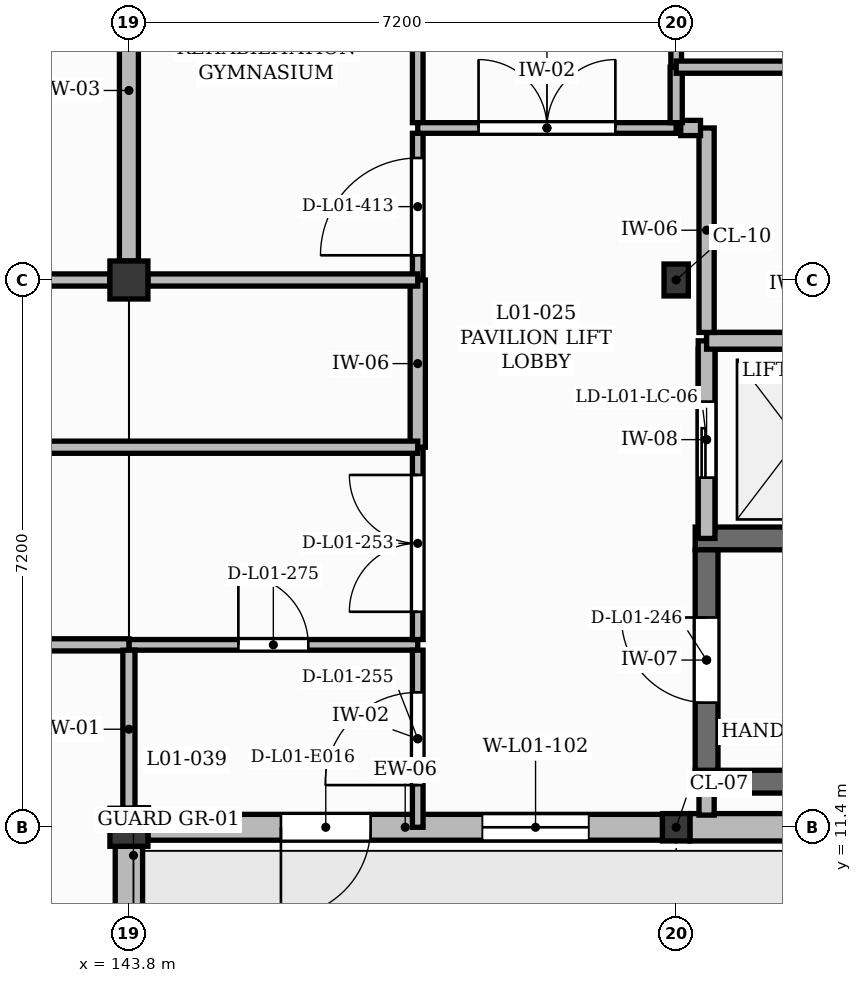
"""IFC4 building model, lengths in metres.
Left out: names, types, materials, properties, quantities, classifications, styles, units other than length and angle.
Written with IfcOpenShell. Run it as: python <this file> out.ifc"""

import sys

from ifc_helpers import new_model, si_unit, direction, frame, frame_2d, origin, origin_2d, place, context, subcontext, project, spatial, rectangle, extrude, element, fill, save


model = new_model("IFC4")
c1 = context("Model", 3, precision=1e-05, world=origin(), true_north=direction((0.0, 1.0)))
c2 = subcontext(c1, "Body", "Model", "MODEL_VIEW")
j1 = project(units=[si_unit("LENGTHUNIT", "METRE"), si_unit("PLANEANGLEUNIT", "RADIAN")], contexts=[c1])
p1 = place(None, origin())
s1 = spatial("IfcSite", under=j1, at=p1, CompositionType="ELEMENT")
p2 = place(p1, origin())
s2 = spatial("IfcBuilding", under=s1, at=p2, CompositionType="ELEMENT")
p3 = place(p2, frame((0.0, 0.0, 4.5)))
s3 = spatial("IfcBuildingStorey", under=s2, at=p3, CompositionType="ELEMENT", Elevation=4.5)
for number, where, z_axis, x_axis in (
    (1, (143.8, 11.4, 0.0), (0.0, 0.0, 1.0), (1.0, 0.0, 0.0)),
    (2, (143.8, 18.6, 0.0), (0.0, 0.0, 1.0), (1.0, 0.0, 0.0)),
):
    element("IfcColumn", number, at=place(p3, frame(where, z_axis=z_axis, x_axis=x_axis)), inside=s3, PredefinedType="COLUMN", context=c2, shape_type="SweptSolid", body=[
        extrude(rectangle(XDim=0.5, YDim=0.5, at=origin_2d()), origin(), (0.0, 0.0, 1.0), 4.22),
    ])
p4 = place(p3, frame((151.0, 11.4, 0.0), z_axis=(0.0, 0.0, 1.0), x_axis=(1.0, 0.0, 0.0)))
e3 = element("IfcColumn", 3, at=p4, inside=s3, PredefinedType="COLUMN", context=c2, shape_type="SweptSolid", body=[
    extrude(rectangle(XDim=0.36, YDim=0.36, at=origin_2d()), origin(), (0.0, 0.0, 1.0), 4.26),
])
p5 = place(p3, frame((151.0, 18.6, 0.0), z_axis=(0.0, 0.0, 1.0), x_axis=(1.0, 0.0, 0.0)))
e4 = element("IfcColumn", 4, at=p5, inside=s3, PredefinedType="COLUMN", context=c2, shape_type="SweptSolid", body=[
    extrude(rectangle(XDim=0.32, YDim=0.42, at=origin_2d()), origin(), (0.0, 0.0, 1.0), 4.26),
])
p6 = place(p3, frame((143.8, 4.45, 0.0), z_axis=(0.0, 0.0, 1.0), x_axis=(0.0, 1.0, 0.0)))
e5 = element("IfcWall", 5, at=p6, inside=s3, PredefinedType="SOLIDWALL", context=c2, shape_type="SweptSolid", body=[
    extrude(rectangle(XDim=6.7, YDim=0.36, at=frame_2d((3.35, 0.0))), origin(), (0.0, 0.0, 1.0), 3.52),
])
p7 = place(p6, frame((0.665, 0.0, 1.05)))
e6 = element("IfcOpeningElement", 6, at=p7, cuts=e5, PredefinedType="OPENING", context=c2, shape_type="SweptSolid", body=[
    extrude(rectangle(XDim=1.54, YDim=1.65, at=frame_2d((0.77, 0.825))), frame((0.0, 0.19, 0.0), z_axis=(0.0, -1.0, 0.0), x_axis=(1.0, 0.0, 0.0)), (0.0, 0.0, 1.0), 0.38),
])
p8 = place(p6, frame((3.475, 0.0, 1.5)))
e7 = element("IfcOpeningElement", 7, at=p8, cuts=e5, PredefinedType="OPENING", context=c2, shape_type="SweptSolid", body=[
    extrude(rectangle(XDim=1.15, YDim=1.25, at=frame_2d((0.575, 0.625))), frame((0.0, 0.19, 0.0), z_axis=(0.0, -1.0, 0.0), x_axis=(1.0, 0.0, 0.0)), (0.0, 0.0, 1.0), 0.38),
])
p9 = place(p3, frame((144.05, 11.4, 0.0), z_axis=(0.0, 0.0, 1.0), x_axis=(1.0, 0.0, 0.0)))
e8 = element("IfcWall", 8, at=p9, inside=s3, PredefinedType="SOLIDWALL", context=c2, shape_type="SweptSolid", body=[
    extrude(rectangle(XDim=6.77, YDim=0.34, at=frame_2d((3.385, 0.0))), origin(), (0.0, 0.0, 1.0), 3.76),
])
p10 = place(p9, frame((1.75, 0.0, 0.0)))
e9 = element("IfcOpeningElement", 9, at=p10, cuts=e8, PredefinedType="OPENING", context=c2, shape_type="SweptSolid", body=[
    extrude(rectangle(XDim=1.18, YDim=2.2, at=frame_2d((0.59, 1.1))), frame((0.0, 0.18, 0.0), z_axis=(0.0, -1.0, 0.0), x_axis=(1.0, 0.0, 0.0)), (0.0, 0.0, 1.0), 0.36),
])
p11 = place(p9, frame((4.4, 0.0, 1.05)))
e10 = element("IfcOpeningElement", 10, at=p11, cuts=e8, PredefinedType="OPENING", context=c2, shape_type="SweptSolid", body=[
    extrude(rectangle(XDim=1.4, YDim=1.65, at=frame_2d((0.7, 0.825))), frame((0.0, 0.18, 0.0), z_axis=(0.0, -1.0, 0.0), x_axis=(1.0, 0.0, 0.0)), (0.0, 0.0, 1.0), 0.36),
])
p12 = place(p3, frame((151.18, 11.4, 0.0), z_axis=(0.0, 0.0, 1.0), x_axis=(1.0, 0.0, 0.0)))
e11 = element("IfcWall", 11, at=p12, inside=s3, PredefinedType="SOLIDWALL", context=c2, shape_type="SweptSolid", body=[
    extrude(rectangle(XDim=6.86, YDim=0.36, at=frame_2d((3.43, 0.0))), origin(), (0.0, 0.0, 1.0), 3.8),
])
for number, where, z_axis, x_axis in (
    (12, (151.25, 12.0, 0.0), (0.0, 0.0, 1.0), (1.0, 0.0, 0.0)),
    (13, (151.25, 15.2, 0.0), (0.0, 0.0, 1.0), (1.0, 0.0, 0.0)),
):
    element("IfcWall", number, at=place(p3, frame(where, z_axis=z_axis, x_axis=x_axis)), inside=s3, PredefinedType="SHEAR", context=c2, shape_type="SweptSolid", body=[
        extrude(rectangle(XDim=6.7, YDim=0.3, at=frame_2d((3.35, 0.0))), origin(), (0.0, 0.0, 1.0), 4.25),
    ])
p13 = place(p3, frame((151.4, 12.15, 0.0), z_axis=(0.0, 0.0, 1.0), x_axis=(0.0, 1.0, 0.0)))
e14 = element("IfcWall", 14, at=p13, inside=s3, PredefinedType="SHEAR", context=c2, shape_type="SweptSolid", body=[
    extrude(rectangle(XDim=2.9, YDim=0.3, at=frame_2d((1.45, 0.0))), origin(), (0.0, 0.0, 1.0), 4.25),
])
p14 = place(p13, frame((0.89, 0.0, 0.0)))
e15 = element("IfcOpeningElement", 15, at=p14, cuts=e14, PredefinedType="OPENING", context=c2, shape_type="SweptSolid", body=[
    extrude(rectangle(XDim=1.12, YDim=2.1, at=frame_2d((0.56, 1.05))), frame((0.0, 0.16, 0.0), z_axis=(0.0, -1.0, 0.0), x_axis=(1.0, 0.0, 0.0)), (0.0, 0.0, 1.0), 0.32),
])
p15 = place(p3, frame((151.4, 17.8, 0.0), z_axis=(0.0, 0.0, 1.0), x_axis=(1.0, 0.0, 0.0)))
e16 = element("IfcWall", 16, at=p15, inside=s3, PredefinedType="SOLIDWALL", context=c2, shape_type="SweptSolid", body=[
    extrude(rectangle(XDim=2.4, YDim=0.22, at=frame_2d((1.2, 0.0))), origin(), (0.0, 0.0, 1.0), 4.25),
])
p16 = place(p3, frame((151.4, 15.31, 0.0), z_axis=(0.0, 0.0, 1.0), x_axis=(0.0, 1.0, 0.0)))
e17 = element("IfcWall", 17, at=p16, inside=s3, PredefinedType="SOLIDWALL", context=c2, shape_type="SweptSolid", body=[
    extrude(rectangle(XDim=2.38, YDim=0.22, at=frame_2d((1.19, 0.0))), origin(), (0.0, 0.0, 1.0), 4.25),
])
p17 = place(p16, frame((0.69, 0.0, 0.0)))
e18 = element("IfcOpeningElement", 18, at=p17, cuts=e17, PredefinedType="OPENING", context=c2, shape_type="SweptSolid", body=[
    extrude(rectangle(XDim=1.0, YDim=2.15, at=frame_2d((0.5, 1.075))), frame((0.0, 0.12, 0.0), z_axis=(0.0, -1.0, 0.0), x_axis=(1.0, 0.0, 0.0)), (0.0, 0.0, 1.0), 0.24),
])
p18 = place(p3, frame((151.4, 15.2, -0.9), z_axis=(0.0, 0.0, 1.0), x_axis=(0.0, 1.0, 0.0)))
e19 = element("IfcWall", 19, at=p18, inside=s3, PredefinedType="SOLIDWALL", context=c2, shape_type="SweptSolid", body=[
    extrude(rectangle(XDim=2.6, YDim=0.22, at=frame_2d((1.3, 0.0))), origin(), (0.0, 0.0, 1.0), 0.9),
])
p19 = place(p3, frame((151.4, 17.8, -0.9), z_axis=(0.0, 0.0, 1.0), x_axis=(1.0, 0.0, 0.0)))
e20 = element("IfcWall", 20, at=p19, inside=s3, PredefinedType="SOLIDWALL", context=c2, shape_type="SweptSolid", body=[
    extrude(rectangle(XDim=2.4, YDim=0.22, at=frame_2d((1.2, 0.0))), origin(), (0.0, 0.0, 1.0), 0.9),
])
p20 = place(p3, frame((143.8, 13.8, 0.0), z_axis=(0.0, 0.0, 1.0), x_axis=(1.0, 0.0, 0.0)))
e21 = element("IfcWall", 21, at=p20, inside=s3, PredefinedType="PARTITIONING", context=c2, shape_type="SweptSolid", body=[
    extrude(rectangle(XDim=3.8, YDim=0.14, at=frame_2d((1.9, 0.0))), origin(), (0.0, 0.0, 1.0), 4.18),
])
p21 = place(p20, frame((1.44, 0.0, 0.0)))
e22 = element("IfcOpeningElement", 22, at=p21, cuts=e21, PredefinedType="OPENING", context=c2, shape_type="SweptSolid", body=[
    extrude(rectangle(XDim=0.92, YDim=2.1, at=frame_2d((0.46, 1.05))), frame((0.0, 0.08, 0.0), z_axis=(0.0, -1.0, 0.0), x_axis=(1.0, 0.0, 0.0)), (0.0, 0.0, 1.0), 0.16),
])
p22 = place(p3, frame((143.8, 18.85, 0.0), z_axis=(0.0, 0.0, 1.0), x_axis=(0.0, 1.0, 0.0)))
e23 = element("IfcWall", 23, at=p22, inside=s3, PredefinedType="SOLIDWALL", context=c2, shape_type="SweptSolid", body=[
    extrude(rectangle(XDim=4.487, YDim=0.25, at=frame_2d((2.243, 0.0))), origin(), (0.0, 0.0, 1.0), 3.52),
])
p23 = place(p3, frame((147.6, 11.4, 0.0), z_axis=(0.0, 0.0, 1.0), x_axis=(0.0, 1.0, 0.0)))
e24 = element("IfcWall", 24, at=p23, inside=s3, PredefinedType="PARTITIONING", context=c2, shape_type="SweptSolid", body=[
    extrude(rectangle(XDim=2.33, YDim=0.14, at=frame_2d((1.165, 0.0))), origin(), (0.0, 0.0, 1.0), 4.18),
])
p24 = place(p23, frame((0.555, 0.0, 0.0)))
e25 = element("IfcOpeningElement", 25, at=p24, cuts=e24, PredefinedType="OPENING", context=c2, shape_type="SweptSolid", body=[
    extrude(rectangle(XDim=1.22, YDim=2.1, at=frame_2d((0.61, 1.05))), frame((0.0, 0.08, 0.0), z_axis=(0.0, -1.0, 0.0), x_axis=(1.0, 0.0, 0.0)), (0.0, 0.0, 1.0), 0.16),
])
p25 = place(p3, frame((147.6, 13.87, 0.0), z_axis=(0.0, 0.0, 1.0), x_axis=(0.0, 1.0, 0.0)))
e26 = element("IfcWall", 26, at=p25, inside=s3, PredefinedType="PARTITIONING", context=c2, shape_type="SweptSolid", body=[
    extrude(rectangle(XDim=2.53, YDim=0.14, at=frame_2d((1.265, 0.0))), origin(), (0.0, 0.0, 1.0), 4.18),
])
p26 = place(p25, frame((0.365, 0.0, 0.0)))
e27 = element("IfcOpeningElement", 27, at=p26, cuts=e26, PredefinedType="OPENING", context=c2, shape_type="SweptSolid", body=[
    extrude(rectangle(XDim=1.8, YDim=2.3, at=frame_2d((0.9, 1.15))), frame((0.0, 0.08, 0.0), z_axis=(0.0, -1.0, 0.0), x_axis=(1.0, 0.0, 0.0)), (0.0, 0.0, 1.0), 0.16),
])
p27 = place(p3, frame((147.6, 18.6, 0.0), z_axis=(0.0, 0.0, 1.0), x_axis=(0.0, 1.0, 0.0)))
e28 = element("IfcWall", 28, at=p27, inside=s3, PredefinedType="PARTITIONING", context=c2, shape_type="SweptSolid", body=[
    extrude(rectangle(XDim=1.93, YDim=0.14, at=frame_2d((0.965, 0.0))), origin(), (0.0, 0.0, 1.0), 4.18),
])
p28 = place(p27, frame((0.325, 0.0, 0.0)))
e29 = element("IfcOpeningElement", 29, at=p28, cuts=e28, PredefinedType="OPENING", context=c2, shape_type="SweptSolid", body=[
    extrude(rectangle(XDim=1.28, YDim=2.2, at=frame_2d((0.64, 1.1))), frame((0.0, 0.08, 0.0), z_axis=(0.0, -1.0, 0.0), x_axis=(1.0, 0.0, 0.0)), (0.0, 0.0, 1.0), 0.16),
])
p29 = place(p3, frame((147.6, 20.67, 0.0), z_axis=(0.0, 0.0, 1.0), x_axis=(0.0, 1.0, 0.0)))
e30 = element("IfcWall", 30, at=p29, inside=s3, PredefinedType="PARTITIONING", context=c2, shape_type="SweptSolid", body=[
    extrude(rectangle(XDim=2.667, YDim=0.14, at=frame_2d((1.333, 0.0))), origin(), (0.0, 0.0, 1.0), 4.18),
])
p30 = place(p3, frame((147.6, 20.6, 0.0), z_axis=(0.0, 0.0, 1.0), x_axis=(1.0, 0.0, 0.0)))
e31 = element("IfcWall", 31, at=p30, inside=s3, PredefinedType="PARTITIONING", context=c2, shape_type="SweptSolid", body=[
    extrude(rectangle(XDim=3.4, YDim=0.14, at=frame_2d((1.7, 0.0))), origin(), (0.0, 0.0, 1.0), 4.18),
])
p31 = place(p30, frame((0.8, 0.0, 0.0)))
e32 = element("IfcOpeningElement", 32, at=p31, cuts=e31, PredefinedType="OPENING", context=c2, shape_type="SweptSolid", body=[
    extrude(rectangle(XDim=1.8, YDim=2.3, at=frame_2d((0.9, 1.15))), frame((0.0, 0.08, 0.0), z_axis=(0.0, -1.0, 0.0), x_axis=(1.0, 0.0, 0.0)), (0.0, 0.0, 1.0), 0.16),
])
p32 = place(p3, frame((151.0, 21.4, 0.0), z_axis=(0.0, 0.0, 1.0), x_axis=(0.0, 1.0, 0.0)))
e33 = element("IfcWall", 33, at=p32, inside=s3, PredefinedType="PARTITIONING", context=c2, shape_type="SweptSolid", body=[
    extrude(rectangle(XDim=2.6, YDim=0.14, at=frame_2d((1.3, 0.0))), origin(), (0.0, 0.0, 1.0), 3.62),
])
p33 = place(p32, frame((0.85, 0.0, 0.0)))
e34 = element("IfcOpeningElement", 34, at=p33, cuts=e33, PredefinedType="OPENING", context=c2, shape_type="SweptSolid", body=[
    extrude(rectangle(XDim=0.9, YDim=2.1, at=frame_2d((0.45, 1.05))), frame((0.0, 0.08, 0.0), z_axis=(0.0, -1.0, 0.0), x_axis=(1.0, 0.0, 0.0)), (0.0, 0.0, 1.0), 0.16),
])
p34 = place(p3, frame((151.4, 11.56, 0.0), z_axis=(0.0, 0.0, 1.0), x_axis=(0.0, 1.0, 0.0)))
e35 = element("IfcWall", 35, at=p34, inside=s3, PredefinedType="PARTITIONING", context=c2, shape_type="SweptSolid", body=[
    extrude(rectangle(XDim=0.3, YDim=0.2, at=frame_2d((0.15, 0.0))), origin(), (0.0, 0.0, 1.0), 4.18),
])
p35 = place(p3, frame((151.4, 17.91, 0.0), z_axis=(0.0, 0.0, 1.0), x_axis=(0.0, 1.0, 0.0)))
e36 = element("IfcWall", 36, at=p35, inside=s3, PredefinedType="PARTITIONING", context=c2, shape_type="SweptSolid", body=[
    extrude(rectangle(XDim=2.69, YDim=0.2, at=frame_2d((1.345, 0.0))), origin(), (0.0, 0.0, 1.0), 4.18),
])
p36 = place(p3, frame((151.32, 20.6, 0.0), z_axis=(0.0, 0.0, 1.0), x_axis=(-1.0, 0.0, 0.0)))
e37 = element("IfcWall", 37, at=p36, inside=s3, PredefinedType="PARTITIONING", context=c2, shape_type="SweptSolid", body=[
    extrude(rectangle(XDim=0.26, YDim=0.2, at=frame_2d((0.13, 0.0))), origin(), (0.0, 0.0, 1.0), 4.18),
])
p37 = place(p3, frame((147.6, 16.4, 0.0), z_axis=(0.0, 0.0, 1.0), x_axis=(0.0, 1.0, 0.0)))
e38 = element("IfcWall", 38, at=p37, inside=s3, PredefinedType="PARTITIONING", context=c2, shape_type="SweptSolid", body=[
    extrude(rectangle(XDim=2.2, YDim=0.2, at=frame_2d((1.1, 0.0))), origin(), (0.0, 0.0, 1.0), 4.18),
])
p38 = place(p3, frame((136.6, 13.8, 0.0), z_axis=(0.0, 0.0, 1.0), x_axis=(1.0, 0.0, 0.0)))
e39 = element("IfcWall", 39, at=p38, inside=s3, PredefinedType="PARTITIONING", context=c2, shape_type="SweptSolid", body=[
    extrude(rectangle(XDim=7.2, YDim=0.16, at=frame_2d((3.6, 0.0))), origin(), (0.0, 0.0, 1.0), 4.18),
])
p39 = place(p3, frame((147.6, 16.4, 0.0), z_axis=(0.0, 0.0, 1.0), x_axis=(-1.0, 0.0, 0.0)))
e40 = element("IfcWall", 40, at=p39, inside=s3, PredefinedType="PARTITIONING", context=c2, shape_type="SweptSolid", body=[
    extrude(rectangle(XDim=11.0, YDim=0.16, at=frame_2d((5.5, 0.0))), origin(), (0.0, 0.0, 1.0), 4.18),
])
p40 = place(p3, frame((143.8, 11.65, 0.0), z_axis=(0.0, 0.0, 1.0), x_axis=(0.0, 1.0, 0.0)))
e41 = element("IfcWall", 41, at=p40, inside=s3, PredefinedType="PARTITIONING", context=c2, shape_type="SweptSolid", body=[
    extrude(rectangle(XDim=2.08, YDim=0.16, at=frame_2d((1.04, 0.0))), origin(), (0.0, 0.0, 1.0), 3.52),
])
p41 = place(p3, frame((151.0, 20.67, 0.0), z_axis=(0.0, 0.0, 1.0), x_axis=(0.0, 1.0, 0.0)))
e42 = element("IfcWall", 42, at=p41, inside=s3, PredefinedType="PARTITIONING", context=c2, shape_type="SweptSolid", body=[
    extrude(rectangle(XDim=0.73, YDim=0.16, at=frame_2d((0.365, 0.0))), origin(), (0.0, 0.0, 1.0), 3.62),
])
p42 = place(p3, frame((151.0, 21.4, 0.0), z_axis=(0.0, 0.0, 1.0), x_axis=(1.0, 0.0, 0.0)))
e43 = element("IfcWall", 43, at=p42, inside=s3, PredefinedType="PARTITIONING", context=c2, shape_type="SweptSolid", body=[
    extrude(rectangle(XDim=3.2, YDim=0.16, at=frame_2d((1.6, 0.0))), origin(), (0.0, 0.0, 1.0), 4.18),
])
p43 = place(p3, frame((139.343, 18.6, 0.0), z_axis=(0.0, 0.0, 1.0), x_axis=(1.0, 0.0, 0.0)))
e44 = element("IfcWall", 44, at=p43, inside=s3, PredefinedType="PARTITIONING", context=c2, shape_type="SweptSolid", body=[
    extrude(rectangle(XDim=4.207, YDim=0.16, at=frame_2d((2.104, 0.0))), origin(), (0.0, 0.0, 1.0), 3.52),
])
p44 = place(p3, frame((144.05, 18.6, 0.0), z_axis=(0.0, 0.0, 1.0), x_axis=(1.0, 0.0, 0.0)))
e45 = element("IfcWall", 45, at=p44, inside=s3, PredefinedType="PARTITIONING", context=c2, shape_type="SweptSolid", body=[
    extrude(rectangle(XDim=3.55, YDim=0.16, at=frame_2d((1.775, 0.0))), origin(), (0.0, 0.0, 1.0), 3.58),
])
p45 = place(p10, frame((1.18, 0.0, 0.0), z_axis=(0.0, 0.0, 1.0), x_axis=(-1.0, 0.0, 0.0)))
e46 = element("IfcDoor", 46, at=p45, inside=s3, OperationType="SINGLE_SWING_RIGHT", PredefinedType="DOOR", context=c2, shape_type="SweptSolid", body=[
    extrude(rectangle(XDim=1.18, YDim=2.2, at=frame_2d((0.59, 1.1))), frame((0.0, 0.025, 0.0), z_axis=(0.0, -1.0, 0.0), x_axis=(1.0, 0.0, 0.0)), (0.0, 0.0, 1.0), 0.05),
])
fill(e9, e46)
p46 = place(p11, origin())
e47 = element("IfcWindow", 47, at=p46, inside=s3, PartitioningType="SINGLE_PANEL", PredefinedType="WINDOW", context=c2, shape_type="SweptSolid", body=[
    extrude(rectangle(XDim=1.4, YDim=1.65, at=frame_2d((0.7, 0.825))), frame((0.0, 0.03, 0.0), z_axis=(0.0, -1.0, 0.0), x_axis=(1.0, 0.0, 0.0)), (0.0, 0.0, 1.0), 0.06),
])
fill(e10, e47)
p47 = place(p17, origin())
e48 = element("IfcDoor", 48, at=p47, inside=s3, OperationType="SLIDING_TO_LEFT", PredefinedType="DOOR", context=c2, shape_type="SweptSolid", body=[
    extrude(rectangle(XDim=1.0, YDim=2.15, at=frame_2d((0.5, 1.075))), frame((0.0, 0.025, 0.0), z_axis=(0.0, -1.0, 0.0), x_axis=(1.0, 0.0, 0.0)), (0.0, 0.0, 1.0), 0.05),
])
fill(e18, e48)
p48 = place(p14, origin())
e49 = element("IfcDoor", 49, at=p48, inside=s3, OperationType="SINGLE_SWING_RIGHT", PredefinedType="DOOR", context=c2, shape_type="SweptSolid", body=[
    extrude(rectangle(XDim=1.12, YDim=2.1, at=frame_2d((0.56, 1.05))), frame((0.0, 0.025, 0.0), z_axis=(0.0, -1.0, 0.0), x_axis=(1.0, 0.0, 0.0)), (0.0, 0.0, 1.0), 0.05),
])
fill(e15, e49)
p49 = place(p26, origin())
e50 = element("IfcDoor", 50, at=p49, inside=s3, OperationType="DOUBLE_DOOR_SINGLE_SWING", PredefinedType="DOOR", context=c2, shape_type="SweptSolid", body=[
    extrude(rectangle(XDim=1.8, YDim=2.3, at=frame_2d((0.9, 1.15))), frame((0.0, 0.025, 0.0), z_axis=(0.0, -1.0, 0.0), x_axis=(1.0, 0.0, 0.0)), (0.0, 0.0, 1.0), 0.05),
])
fill(e27, e50)
p50 = place(p24, origin())
e51 = element("IfcDoor", 51, at=p50, inside=s3, OperationType="SINGLE_SWING_LEFT", PredefinedType="DOOR", context=c2, shape_type="SweptSolid", body=[
    extrude(rectangle(XDim=1.22, YDim=2.1, at=frame_2d((0.61, 1.05))), frame((0.0, 0.025, 0.0), z_axis=(0.0, -1.0, 0.0), x_axis=(1.0, 0.0, 0.0)), (0.0, 0.0, 1.0), 0.05),
])
fill(e25, e51)
p51 = place(p31, origin())
e52 = element("IfcDoor", 52, at=p51, inside=s3, OperationType="DOUBLE_DOOR_SINGLE_SWING", PredefinedType="DOOR", context=c2, shape_type="SweptSolid", body=[
    extrude(rectangle(XDim=1.8, YDim=2.3, at=frame_2d((0.9, 1.15))), frame((0.0, 0.025, 0.0), z_axis=(0.0, -1.0, 0.0), x_axis=(1.0, 0.0, 0.0)), (0.0, 0.0, 1.0), 0.05),
])
fill(e32, e52)
p52 = place(p21, origin())
e53 = element("IfcDoor", 53, at=p52, inside=s3, OperationType="SINGLE_SWING_LEFT", PredefinedType="DOOR", context=c2, shape_type="SweptSolid", body=[
    extrude(rectangle(XDim=0.92, YDim=2.1, at=frame_2d((0.46, 1.05))), frame((0.0, 0.025, 0.0), z_axis=(0.0, -1.0, 0.0), x_axis=(1.0, 0.0, 0.0)), (0.0, 0.0, 1.0), 0.05),
])
fill(e22, e53)
p53 = place(p28, origin())
e54 = element("IfcDoor", 54, at=p53, inside=s3, OperationType="SINGLE_SWING_LEFT", PredefinedType="DOOR", context=c2, shape_type="SweptSolid", body=[
    extrude(rectangle(XDim=1.28, YDim=2.2, at=frame_2d((0.64, 1.1))), frame((0.0, 0.025, 0.0), z_axis=(0.0, -1.0, 0.0), x_axis=(1.0, 0.0, 0.0)), (0.0, 0.0, 1.0), 0.05),
])
fill(e29, e54)
save(model, sys.argv[1])
